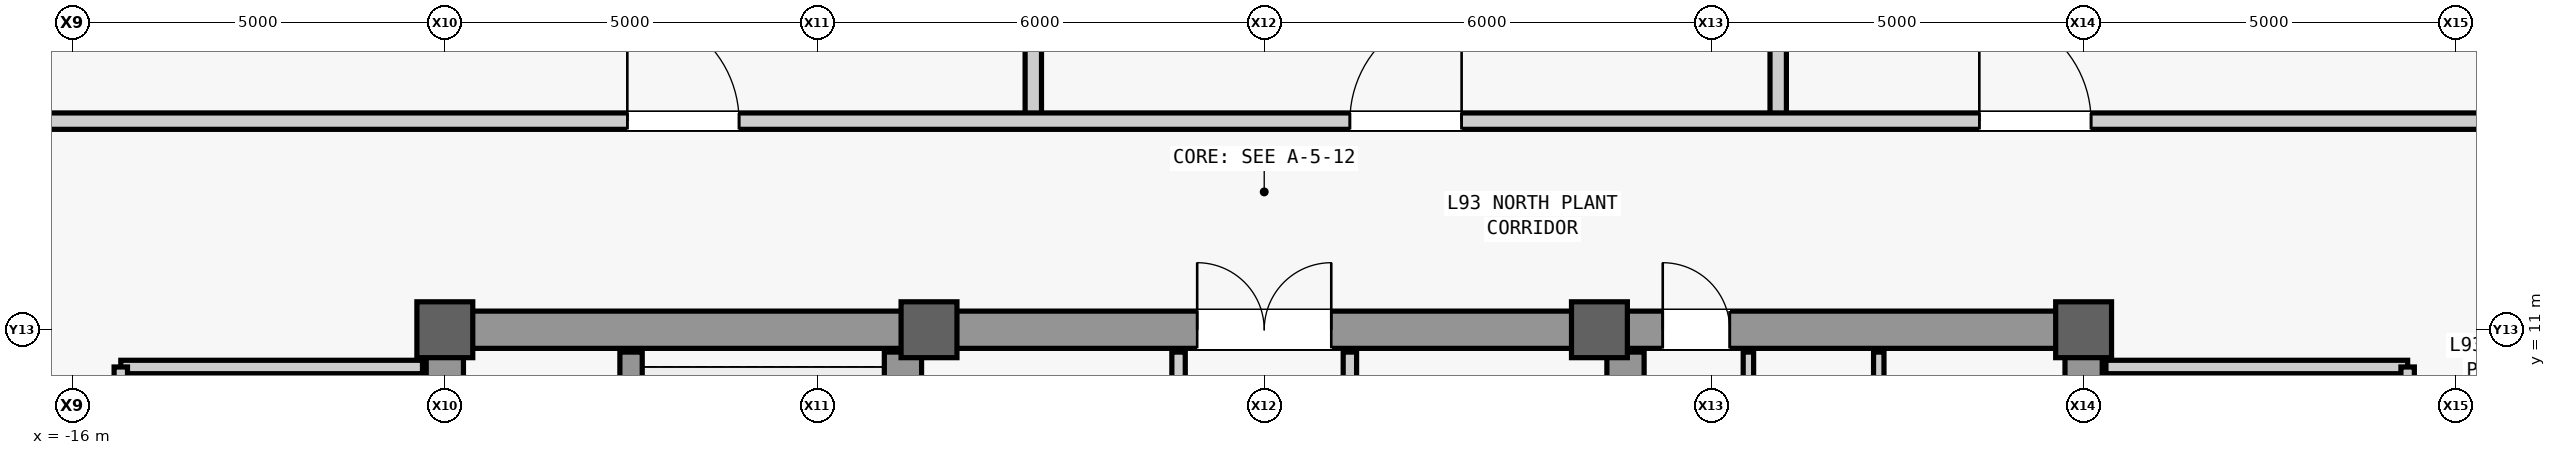
"""IFC4 building model, lengths in metres.
Left out: names, types, materials, properties, quantities, classifications, styles, units other than length and angle.
Written with IfcOpenShell. Run it as: python <this file> out.ifc"""

import sys

from ifc_helpers import new_model, si_unit, direction, frame, frame_2d, origin, origin_2d, place, context, subcontext, project, spatial, rectangle, extrude, source, transform, mapped, element, fill, save


model = new_model("IFC4")
c1 = context("Model", 3, precision=1e-05, world=origin(), true_north=direction((0.0, 1.0)))
c2 = subcontext(c1, "Body", "Model", "MODEL_VIEW")
j1 = project(units=[si_unit("LENGTHUNIT", "METRE"), si_unit("PLANEANGLEUNIT", "RADIAN")], contexts=[c1])
p1 = place(None, origin())
s1 = spatial("IfcSite", under=j1, at=p1, CompositionType="ELEMENT")
p2 = place(p1, origin())
s2 = spatial("IfcBuilding", under=s1, at=p2, CompositionType="ELEMENT")
p3 = place(p2, frame((0.0, 0.0, 394.7)))
s3 = spatial("IfcBuildingStorey", under=s2, at=p3, CompositionType="ELEMENT", Elevation=394.7)
m1 = source(origin(), c2, "Body", "SweptSolid", [
    extrude(rectangle(XDim=22.0, YDim=0.5, at=frame_2d((11.0, 0.0))), origin(), (0.0, 0.0, 1.0), 4.45),
])
p4 = place(p3, frame((-11.0, -11.0, 0.0), z_axis=(0.0, 0.0, 1.0), x_axis=(0.0, 1.0, 0.0)))
e1 = element("IfcWall", 1, at=p4, inside=s3, PredefinedType="SHEAR", context=c2, shape_type="MappedRepresentation", body=[
    mapped(m1, transform((0.0, 0.0, 0.0), scale=1.0)),
])
m2 = source(origin(), c2, "Body", "SweptSolid", [
    extrude(rectangle(XDim=1.1, YDim=2.2, at=frame_2d((0.55, 1.1))), frame((0.0, 0.26, 0.0), z_axis=(0.0, -1.0, 0.0), x_axis=(1.0, 0.0, 0.0)), (0.0, 0.0, 1.0), 0.52),
])
p5 = place(p4, frame((0.8, 0.0, 0.0)))
e2 = element("IfcOpeningElement", 2, at=p5, cuts=e1, PredefinedType="OPENING", context=c2, shape_type="MappedRepresentation", body=[
    mapped(m2, transform((0.0, 0.0, 0.0), scale=1.0)),
])
p6 = place(p4, frame((12.5, 0.0, 0.0)))
e3 = element("IfcOpeningElement", 3, at=p6, cuts=e1, PredefinedType="OPENING", context=c2, shape_type="MappedRepresentation", body=[
    mapped(m2, transform((0.0, 0.0, 0.0), scale=1.0)),
])
m3 = source(origin(), c2, "Body", "SweptSolid", [
    extrude(rectangle(XDim=0.9, YDim=2.15, at=frame_2d((0.45, 1.075))), frame((0.0, 0.26, 0.0), z_axis=(0.0, -1.0, 0.0), x_axis=(1.0, 0.0, 0.0)), (0.0, 0.0, 1.0), 0.52),
])
p7 = place(p4, frame((7.575, 0.0, 0.0)))
e4 = element("IfcOpeningElement", 4, at=p7, cuts=e1, PredefinedType="OPENING", context=c2, shape_type="MappedRepresentation", body=[
    mapped(m3, transform((0.0, 0.0, 0.0), scale=1.0)),
])
m4 = source(origin(), c2, "Body", "SweptSolid", [
    extrude(rectangle(XDim=1.3, YDim=2.3, at=frame_2d((0.65, 1.15))), frame((0.0, 0.26, 0.0), z_axis=(0.0, -1.0, 0.0), x_axis=(1.0, 0.0, 0.0)), (0.0, 0.0, 1.0), 0.52),
])
p8 = place(p4, frame((2.7, 0.0, 0.0)))
e5 = element("IfcOpeningElement", 5, at=p8, cuts=e1, PredefinedType="OPENING", context=c2, shape_type="MappedRepresentation", body=[
    mapped(m4, transform((0.0, 0.0, 0.0), scale=1.0)),
])
p9 = place(p3, frame((11.0, -11.0, 0.0), z_axis=(0.0, 0.0, 1.0), x_axis=(0.0, 1.0, 0.0)))
e6 = element("IfcWall", 6, at=p9, inside=s3, PredefinedType="SHEAR", context=c2, shape_type="MappedRepresentation", body=[
    mapped(m1, transform((0.0, 0.0, 0.0), scale=1.0)),
])
p10 = place(p9, frame((0.8, 0.0, 0.0)))
e7 = element("IfcOpeningElement", 7, at=p10, cuts=e6, PredefinedType="OPENING", context=c2, shape_type="MappedRepresentation", body=[
    mapped(m2, transform((0.0, 0.0, 0.0), scale=1.0)),
])
p11 = place(p9, frame((7.575, 0.0, 0.0)))
e8 = element("IfcOpeningElement", 8, at=p11, cuts=e6, PredefinedType="OPENING", context=c2, shape_type="MappedRepresentation", body=[
    mapped(m3, transform((0.0, 0.0, 0.0), scale=1.0)),
])
p12 = place(p9, frame((2.7, 0.0, 0.0)))
e9 = element("IfcOpeningElement", 9, at=p12, cuts=e6, PredefinedType="OPENING", context=c2, shape_type="MappedRepresentation", body=[
    mapped(m4, transform((0.0, 0.0, 0.0), scale=1.0)),
])
p13 = place(p9, frame((13.35, 0.0, 0.0)))
e10 = element("IfcOpeningElement", 10, at=p13, cuts=e6, PredefinedType="OPENING", context=c2, shape_type="MappedRepresentation", body=[
    mapped(m4, transform((0.0, 0.0, 0.0), scale=1.0)),
])
m5 = source(origin(), c2, "Body", "SweptSolid", [
    extrude(rectangle(XDim=21.4, YDim=0.5, at=frame_2d((10.7, 0.0))), origin(), (0.0, 0.0, 1.0), 4.45),
])
for number, where, z_axis, x_axis in (
    (11, (-4.85, -10.7, 0.0), (0.0, 0.0, 1.0), (0.0, 1.0, 0.0)),
    (12, (4.85, -10.7, 0.0), (0.0, 0.0, 1.0), (0.0, 1.0, 0.0)),
):
    element("IfcWall", number, at=place(p3, frame(where, z_axis=z_axis, x_axis=x_axis)), inside=s3, PredefinedType="SHEAR", context=c2, shape_type="MappedRepresentation", body=[
        mapped(m5, transform((0.0, 0.0, 0.0), scale=1.0)),
    ])
m6 = source(origin(), c2, "Body", "SweptSolid", [
    extrude(rectangle(XDim=5.9, YDim=0.5, at=frame_2d((2.95, 0.0))), origin(), (0.0, 0.0, 1.0), 4.45),
])
p14 = place(p3, frame((-10.75, 11.0, 0.0), z_axis=(0.0, 0.0, 1.0), x_axis=(1.0, 0.0, 0.0)))
e13 = element("IfcWall", 13, at=p14, inside=s3, PredefinedType="SHEAR", context=c2, shape_type="MappedRepresentation", body=[
    mapped(m6, transform((0.0, 0.0, 0.0), scale=1.0)),
])
p15 = place(p3, frame((4.85, 11.0, 0.0), z_axis=(0.0, 0.0, 1.0), x_axis=(1.0, 0.0, 0.0)))
e14 = element("IfcWall", 14, at=p15, inside=s3, PredefinedType="SHEAR", context=c2, shape_type="MappedRepresentation", body=[
    mapped(m6, transform((0.0, 0.0, 0.0), scale=1.0)),
])
p16 = place(p15, frame((0.5, 0.0, 0.0)))
e15 = element("IfcOpeningElement", 15, at=p16, cuts=e14, PredefinedType="OPENING", context=c2, shape_type="MappedRepresentation", body=[
    mapped(m3, transform((0.0, 0.0, 0.0), scale=1.0)),
])
m7 = source(origin(), c2, "Body", "SweptSolid", [
    extrude(rectangle(XDim=9.2, YDim=0.5, at=frame_2d((4.6, 0.0))), origin(), (0.0, 0.0, 1.0), 4.45),
])
p17 = place(p3, frame((-4.6, 11.0, 0.0), z_axis=(0.0, 0.0, 1.0), x_axis=(1.0, 0.0, 0.0)))
e16 = element("IfcWall", 16, at=p17, inside=s3, PredefinedType="SHEAR", context=c2, shape_type="MappedRepresentation", body=[
    mapped(m7, transform((0.0, 0.0, 0.0), scale=1.0)),
])
m8 = source(origin(), c2, "Body", "SweptSolid", [
    extrude(rectangle(XDim=1.8, YDim=2.25, at=frame_2d((0.9, 1.125))), frame((0.0, 0.26, 0.0), z_axis=(0.0, -1.0, 0.0), x_axis=(1.0, 0.0, 0.0)), (0.0, 0.0, 1.0), 0.52),
])
p18 = place(p17, frame((3.7, 0.0, 0.0)))
e17 = element("IfcOpeningElement", 17, at=p18, cuts=e16, PredefinedType="OPENING", context=c2, shape_type="MappedRepresentation", body=[
    mapped(m8, transform((0.0, 0.0, 0.0), scale=1.0)),
])
m9 = source(origin(), c2, "Body", "SweptSolid", [
    extrude(rectangle(XDim=0.75, YDim=0.75, at=origin_2d()), origin(), (0.0, 0.0, 1.0), 4.8),
])
for number, where, z_axis, x_axis in (
    (18, (-11.0, 11.0, 0.0), (0.0, 0.0, 1.0), (1.0, 0.0, 0.0)),
    (19, (-4.5, 11.0, 0.0), (0.0, 0.0, 1.0), (1.0, 0.0, 0.0)),
    (20, (4.5, 11.0, 0.0), (0.0, 0.0, 1.0), (1.0, 0.0, 0.0)),
    (21, (11.0, 11.0, 0.0), (0.0, 0.0, 1.0), (1.0, 0.0, 0.0)),
):
    element("IfcColumn", number, at=place(p3, frame(where, z_axis=z_axis, x_axis=x_axis)), inside=s3, PredefinedType="COLUMN", context=c2, shape_type="MappedRepresentation", body=[
        mapped(m9, transform((0.0, 0.0, 0.0), scale=1.0)),
    ])
m10 = source(origin(), c2, "Body", "SweptSolid", [
    extrude(rectangle(XDim=7.75, YDim=0.3, at=frame_2d((3.875, 0.0))), origin(), (0.0, 0.0, 1.0), 4.45),
])
p19 = place(p3, frame((-8.5, 2.95, 0.0), z_axis=(0.0, 0.0, 1.0), x_axis=(0.0, 1.0, 0.0)))
e22 = element("IfcWall", 22, at=p19, inside=s3, PredefinedType="SHEAR", context=c2, shape_type="MappedRepresentation", body=[
    mapped(m10, transform((0.0, 0.0, 0.0), scale=1.0)),
])
m11 = source(origin(), c2, "Body", "SweptSolid", [
    extrude(rectangle(XDim=9.4, YDim=0.14, at=frame_2d((4.7, 0.0))), origin(), (0.0, 0.0, 1.0), 4.45),
])
p20 = place(p3, frame((8.25, 1.3, 0.0), z_axis=(0.0, 0.0, 1.0), x_axis=(0.0, 1.0, 0.0)))
e23 = element("IfcWall", 23, at=p20, inside=s3, PredefinedType="PARTITIONING", context=c2, shape_type="MappedRepresentation", body=[
    mapped(m11, transform((0.0, 0.0, 0.0), scale=1.0)),
])
m12 = source(origin(), c2, "Body", "SweptSolid", [
    extrude(rectangle(XDim=5.7, YDim=0.14, at=frame_2d((2.85, 0.0))), origin(), (0.0, 0.0, 1.0), 4.45),
])
p21 = place(p3, frame((6.5, 5.0, 0.0), z_axis=(0.0, 0.0, 1.0), x_axis=(0.0, 1.0, 0.0)))
e24 = element("IfcWall", 24, at=p21, inside=s3, PredefinedType="PARTITIONING", context=c2, shape_type="MappedRepresentation", body=[
    mapped(m12, transform((0.0, 0.0, 0.0), scale=1.0)),
])
m13 = source(origin(), c2, "Body", "SweptSolid", [
    extrude(rectangle(XDim=0.9, YDim=2.15, at=frame_2d((0.45, 1.075))), frame((0.0, 0.08, 0.0), z_axis=(0.0, -1.0, 0.0), x_axis=(1.0, 0.0, 0.0)), (0.0, 0.0, 1.0), 0.16),
])
p22 = place(p21, frame((2.05, 0.0, 0.0)))
e25 = element("IfcOpeningElement", 25, at=p22, cuts=e24, PredefinedType="OPENING", context=c2, shape_type="MappedRepresentation", body=[
    mapped(m13, transform((0.0, 0.0, 0.0), scale=1.0)),
])
m14 = source(origin(), c2, "Body", "SweptSolid", [
    extrude(rectangle(XDim=4.05, YDim=0.18, at=frame_2d((2.025, 0.0))), origin(), (0.0, 0.0, 1.0), 4.45),
])
p23 = place(p3, frame((-15.35, 10.5, 0.0), z_axis=(0.0, 0.0, 1.0), x_axis=(1.0, 0.0, 0.0)))
e26 = element("IfcWall", 26, at=p23, inside=s3, PredefinedType="PARTITIONING", context=c2, shape_type="MappedRepresentation", body=[
    mapped(m14, transform((0.0, 0.0, 0.0), scale=1.0)),
])
m15 = source(origin(), c2, "Body", "SweptSolid", [
    extrude(rectangle(XDim=16.6, YDim=0.18, at=frame_2d((8.3, 0.0))), origin(), (0.0, 0.0, 1.0), 4.45),
])
p24 = place(p3, frame((-15.35, -6.1, 0.0), z_axis=(0.0, 0.0, 1.0), x_axis=(0.0, 1.0, 0.0)))
e27 = element("IfcWall", 27, at=p24, inside=s3, PredefinedType="PARTITIONING", context=c2, shape_type="MappedRepresentation", body=[
    mapped(m15, transform((0.0, 0.0, 0.0), scale=1.0)),
])
m16 = source(origin(), c2, "Body", "SweptSolid", [
    extrude(rectangle(XDim=1.8, YDim=2.25, at=frame_2d((0.9, 1.125))), frame((0.0, 0.1, 0.0), z_axis=(0.0, -1.0, 0.0), x_axis=(1.0, 0.0, 0.0)), (0.0, 0.0, 1.0), 0.2),
])
p25 = place(p24, frame((2.7, 0.0, 0.0)))
e28 = element("IfcOpeningElement", 28, at=p25, cuts=e27, PredefinedType="OPENING", context=c2, shape_type="MappedRepresentation", body=[
    mapped(m16, transform((0.0, 0.0, 0.0), scale=1.0)),
])
p26 = place(p24, frame((11.0, 0.0, 0.0)))
e29 = element("IfcOpeningElement", 29, at=p26, cuts=e27, PredefinedType="OPENING", context=c2, shape_type="MappedRepresentation", body=[
    mapped(m16, transform((0.0, 0.0, 0.0), scale=1.0)),
])
p27 = place(p3, frame((11.3, 10.5, 0.0), z_axis=(0.0, 0.0, 1.0), x_axis=(1.0, 0.0, 0.0)))
e30 = element("IfcWall", 30, at=p27, inside=s3, PredefinedType="PARTITIONING", context=c2, shape_type="MappedRepresentation", body=[
    mapped(m14, transform((0.0, 0.0, 0.0), scale=1.0)),
])
p28 = place(p3, frame((15.35, -6.1, 0.0), z_axis=(0.0, 0.0, 1.0), x_axis=(0.0, 1.0, 0.0)))
e31 = element("IfcWall", 31, at=p28, inside=s3, PredefinedType="PARTITIONING", context=c2, shape_type="MappedRepresentation", body=[
    mapped(m15, transform((0.0, 0.0, 0.0), scale=1.0)),
])
p29 = place(p28, frame((2.7, 0.0, 0.0)))
e32 = element("IfcOpeningElement", 32, at=p29, cuts=e31, PredefinedType="OPENING", context=c2, shape_type="MappedRepresentation", body=[
    mapped(m16, transform((0.0, 0.0, 0.0), scale=1.0)),
])
p30 = place(p28, frame((13.0, 0.0, 0.0)))
e33 = element("IfcOpeningElement", 33, at=p30, cuts=e31, PredefinedType="OPENING", context=c2, shape_type="MappedRepresentation", body=[
    mapped(m16, transform((0.0, 0.0, 0.0), scale=1.0)),
])
m17 = source(origin(), c2, "Body", "SweptSolid", [
    extrude(rectangle(XDim=5.4, YDim=0.18, at=frame_2d((2.7, 0.0))), origin(), (0.0, 0.0, 1.0), 4.45),
])
p31 = place(p3, frame((-1.15, 5.3, 0.0), z_axis=(0.0, 0.0, 1.0), x_axis=(0.0, 1.0, 0.0)))
e34 = element("IfcWall", 34, at=p31, inside=s3, PredefinedType="PARTITIONING", context=c2, shape_type="MappedRepresentation", body=[
    mapped(m17, transform((0.0, 0.0, 0.0), scale=1.0)),
])
m18 = source(origin(), c2, "Body", "SweptSolid", [
    extrude(rectangle(XDim=0.9, YDim=2.15, at=frame_2d((0.45, 1.075))), frame((0.0, 0.1, 0.0), z_axis=(0.0, -1.0, 0.0), x_axis=(1.0, 0.0, 0.0)), (0.0, 0.0, 1.0), 0.2),
])
p32 = place(p31, frame((0.7, 0.0, 0.0)))
e35 = element("IfcOpeningElement", 35, at=p32, cuts=e34, PredefinedType="OPENING", context=c2, shape_type="MappedRepresentation", body=[
    mapped(m18, transform((0.0, 0.0, 0.0), scale=1.0)),
])
p33 = place(p31, frame((3.4, 0.0, 0.0)))
e36 = element("IfcOpeningElement", 36, at=p33, cuts=e34, PredefinedType="OPENING", context=c2, shape_type="MappedRepresentation", body=[
    mapped(m18, transform((0.0, 0.0, 0.0), scale=1.0)),
])
p34 = place(p3, frame((1.15, 5.3, 0.0), z_axis=(0.0, 0.0, 1.0), x_axis=(0.0, 1.0, 0.0)))
e37 = element("IfcWall", 37, at=p34, inside=s3, PredefinedType="PARTITIONING", context=c2, shape_type="MappedRepresentation", body=[
    mapped(m17, transform((0.0, 0.0, 0.0), scale=1.0)),
])
p35 = place(p34, frame((0.45, 0.0, 0.0)))
e38 = element("IfcOpeningElement", 38, at=p35, cuts=e37, PredefinedType="OPENING", context=c2, shape_type="MappedRepresentation", body=[
    mapped(m18, transform((0.0, 0.0, 0.0), scale=1.0)),
])
p36 = place(p34, frame((2.25, 0.0, 0.0)))
e39 = element("IfcOpeningElement", 39, at=p36, cuts=e37, PredefinedType="OPENING", context=c2, shape_type="MappedRepresentation", body=[
    mapped(m18, transform((0.0, 0.0, 0.0), scale=1.0)),
])
p37 = place(p34, frame((4.05, 0.0, 0.0)))
e40 = element("IfcOpeningElement", 40, at=p37, cuts=e37, PredefinedType="OPENING", context=c2, shape_type="MappedRepresentation", body=[
    mapped(m18, transform((0.0, 0.0, 0.0), scale=1.0)),
])
m19 = source(origin(), c2, "Body", "SweptSolid", [
    extrude(rectangle(XDim=10.2, YDim=0.22, at=frame_2d((5.1, 0.0))), origin(), (0.0, 0.0, 1.0), 4.45),
])
for number, where, z_axis, x_axis in (
    (41, (-3.1, 13.8, 0.0), (0.0, 0.0, 1.0), (0.0, 1.0, 0.0)),
    (42, (6.9, 13.8, 0.0), (0.0, 0.0, 1.0), (0.0, 1.0, 0.0)),
):
    element("IfcWall", number, at=place(p3, frame(where, z_axis=z_axis, x_axis=x_axis)), inside=s3, PredefinedType="PARTITIONING", context=c2, shape_type="MappedRepresentation", body=[
        mapped(m19, transform((0.0, 0.0, 0.0), scale=1.0)),
    ])
m20 = source(origin(), c2, "Body", "SweptSolid", [
    extrude(rectangle(XDim=36.0, YDim=0.22, at=frame_2d((18.0, 0.0))), origin(), (0.0, 0.0, 1.0), 4.45),
])
p38 = place(p3, frame((-18.0, 13.8, 0.0), z_axis=(0.0, 0.0, 1.0), x_axis=(1.0, 0.0, 0.0)))
e43 = element("IfcWall", 43, at=p38, inside=s3, PredefinedType="PARTITIONING", context=c2, shape_type="MappedRepresentation", body=[
    mapped(m20, transform((0.0, 0.0, 0.0), scale=1.0)),
])
m21 = source(origin(), c2, "Body", "SweptSolid", [
    extrude(rectangle(XDim=1.5, YDim=2.3, at=frame_2d((0.75, 1.15))), frame((0.0, 0.12, 0.0), z_axis=(0.0, -1.0, 0.0), x_axis=(1.0, 0.0, 0.0)), (0.0, 0.0, 1.0), 0.24),
])
p39 = place(p38, frame((9.45, 0.0, 0.0)))
e44 = element("IfcOpeningElement", 44, at=p39, cuts=e43, PredefinedType="OPENING", context=c2, shape_type="MappedRepresentation", body=[
    mapped(m21, transform((0.0, 0.0, 0.0), scale=1.0)),
])
p40 = place(p38, frame((19.15, 0.0, 0.0)))
e45 = element("IfcOpeningElement", 45, at=p40, cuts=e43, PredefinedType="OPENING", context=c2, shape_type="MappedRepresentation", body=[
    mapped(m21, transform((0.0, 0.0, 0.0), scale=1.0)),
])
p41 = place(p38, frame((27.6, 0.0, 0.0)))
e46 = element("IfcOpeningElement", 46, at=p41, cuts=e43, PredefinedType="OPENING", context=c2, shape_type="MappedRepresentation", body=[
    mapped(m21, transform((0.0, 0.0, 0.0), scale=1.0)),
])
m22 = source(origin(), c2, "Body", "SweptSolid", [
    extrude(rectangle(XDim=0.9, YDim=2.15, at=frame_2d((0.45, 1.075))), frame((0.0, 0.025, 0.0), z_axis=(0.0, -1.0, 0.0), x_axis=(1.0, 0.0, 0.0)), (0.0, 0.0, 1.0), 0.05),
])
p42 = place(p16, origin())
e47 = element("IfcDoor", 47, at=p42, inside=s3, OperationType="SINGLE_SWING_LEFT", PredefinedType="DOOR", context=c2, shape_type="MappedRepresentation", body=[
    mapped(m22, transform((0.0, 0.0, 0.0), scale=1.0)),
])
fill(e15, e47)
m23 = source(origin(), c2, "Body", "SweptSolid", [
    extrude(rectangle(XDim=1.8, YDim=2.25, at=frame_2d((0.9, 1.125))), frame((0.0, 0.025, 0.0), z_axis=(0.0, -1.0, 0.0), x_axis=(1.0, 0.0, 0.0)), (0.0, 0.0, 1.0), 0.05),
])
p43 = place(p18, origin())
e48 = element("IfcDoor", 48, at=p43, inside=s3, OperationType="SINGLE_SWING_RIGHT", PredefinedType="DOOR", context=c2, shape_type="MappedRepresentation", body=[
    mapped(m23, transform((0.0, 0.0, 0.0), scale=1.0)),
])
fill(e17, e48)
m24 = source(origin(), c2, "Body", "SweptSolid", [
    extrude(rectangle(XDim=1.5, YDim=2.3, at=frame_2d((0.75, 1.15))), frame((0.0, 0.025, 0.0), z_axis=(0.0, -1.0, 0.0), x_axis=(1.0, 0.0, 0.0)), (0.0, 0.0, 1.0), 0.05),
])
p44 = place(p39, origin())
e49 = element("IfcDoor", 49, at=p44, inside=s3, OperationType="SINGLE_SWING_LEFT", PredefinedType="DOOR", context=c2, shape_type="MappedRepresentation", body=[
    mapped(m24, transform((0.0, 0.0, 0.0), scale=1.0)),
])
fill(e44, e49)
p45 = place(p40, origin())
e50 = element("IfcDoor", 50, at=p45, inside=s3, OperationType="SINGLE_SWING_RIGHT", PredefinedType="DOOR", context=c2, shape_type="MappedRepresentation", body=[
    mapped(m24, transform((0.0, 0.0, 0.0), scale=1.0)),
])
fill(e45, e50)
p46 = place(p41, origin())
e51 = element("IfcDoor", 51, at=p46, inside=s3, OperationType="SINGLE_SWING_LEFT", PredefinedType="DOOR", context=c2, shape_type="MappedRepresentation", body=[
    mapped(m24, transform((0.0, 0.0, 0.0), scale=1.0)),
])
fill(e46, e51)
save(model, sys.argv[1])
